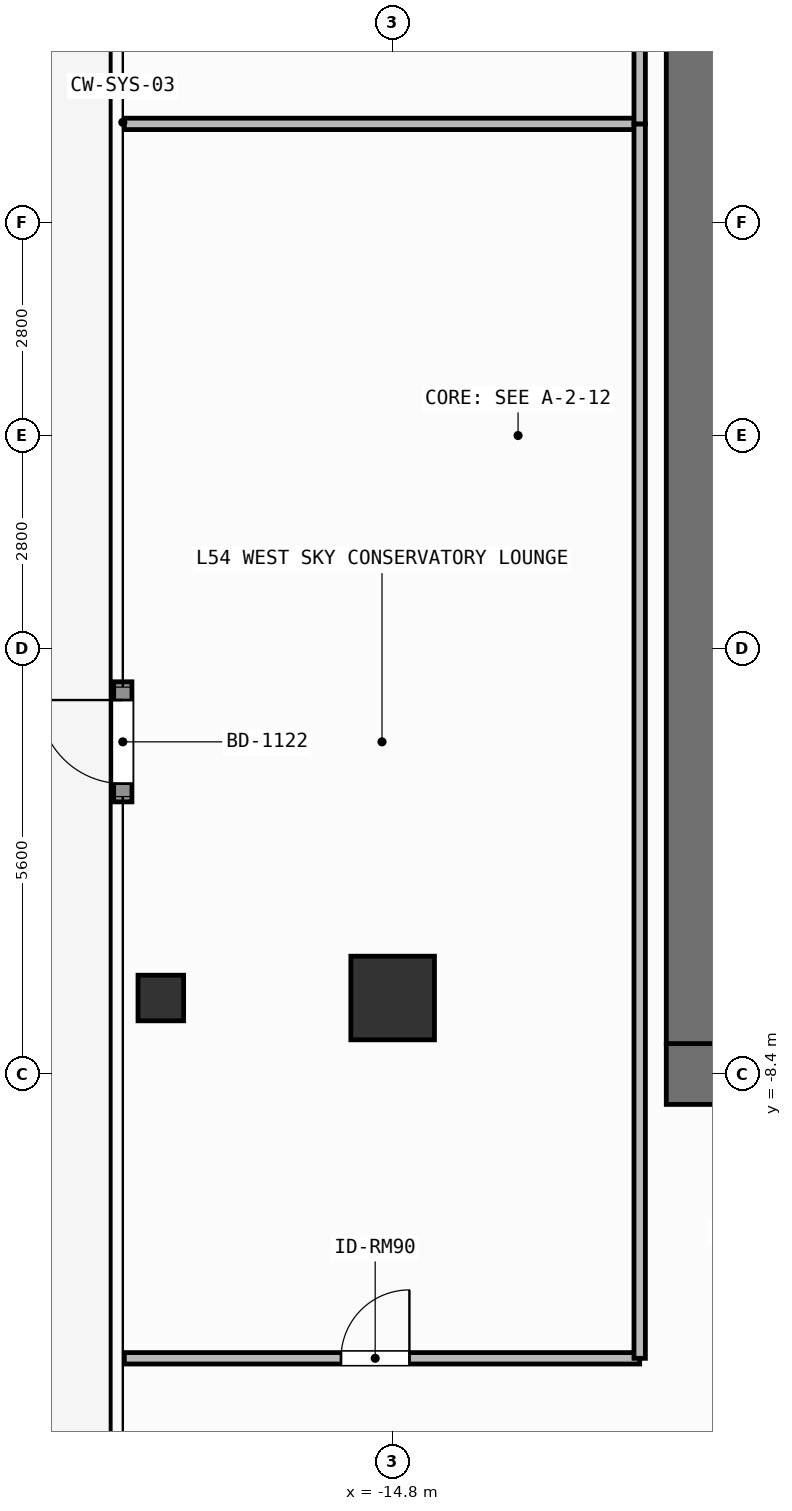
"""IFC4 building model, lengths in metres.
Left out: names, types, materials, properties, quantities, classifications, styles, units other than length and angle.
Written with IfcOpenShell. Run it as: python <this file> out.ifc"""

import sys

from ifc_helpers import new_model, si_unit, direction, frame, frame_2d, origin, origin_2d, place, context, subcontext, project, spatial, rectangle, hollow_rectangle, extrude, element, fill, save


model = new_model("IFC4")
c1 = context("Model", 3, precision=1e-05, world=origin(), true_north=direction((0.0, 1.0)))
c2 = subcontext(c1, "Body", "Model", "MODEL_VIEW")
j1 = project(units=[si_unit("LENGTHUNIT", "METRE"), si_unit("PLANEANGLEUNIT", "RADIAN")], contexts=[c1])
p1 = place(None, origin())
s1 = spatial("IfcSite", under=j1, at=p1, CompositionType="ELEMENT")
p2 = place(p1, origin())
s2 = spatial("IfcBuilding", under=s1, at=p2, CompositionType="ELEMENT")
p3 = place(p2, frame((0.0, 0.0, 219.6)))
s3 = spatial("IfcBuildingStorey", under=s2, at=p3, CompositionType="ELEMENT", Elevation=219.6)
p4 = place(p3, frame((-11.2, -8.4, 0.0), z_axis=(0.0, 0.0, 1.0), x_axis=(1.0, 0.0, 0.0)))
e1 = element("IfcWall", 1, at=p4, inside=s3, PredefinedType="SHEAR", context=c2, shape_type="SweptSolid", body=[
    extrude(rectangle(XDim=1.5, YDim=0.8, at=frame_2d((0.75, 0.0))), origin(), (0.0, 0.0, 1.0), 3.9),
])
p5 = place(p3, frame((-10.8, -8.0, 0.0), z_axis=(0.0, 0.0, 1.0), x_axis=(0.0, 1.0, 0.0)))
e2 = element("IfcWall", 2, at=p5, inside=s3, PredefinedType="SHEAR", context=c2, shape_type="SweptSolid", body=[
    extrude(rectangle(XDim=16.0, YDim=0.8, at=frame_2d((8.0, 0.0))), origin(), (0.0, 0.0, 1.0), 3.9),
])
p6 = place(p3, frame((-14.8, -7.4, 0.0), z_axis=(0.0, 0.0, 1.0), x_axis=(1.0, 0.0, 0.0)))
e3 = element("IfcColumn", 3, at=p6, inside=s3, PredefinedType="COLUMN", context=c2, shape_type="SweptSolid", body=[
    extrude(rectangle(XDim=1.1, YDim=1.1, at=origin_2d()), origin(), (0.0, 0.0, 1.0), 3.9),
])
p7 = place(p3, frame((-17.85, -7.4, 0.0), z_axis=(0.0, 0.0, 1.0), x_axis=(1.0, 0.0, 0.0)))
e4 = element("IfcColumn", 4, at=p7, inside=s3, PredefinedType="COLUMN", context=c2, shape_type="SweptSolid", body=[
    extrude(hollow_rectangle(XDim=0.6, YDim=0.6, WallThickness=0.028, at=origin_2d()), origin(), (0.0, 0.0, 1.0), 3.9),
])
p8 = place(p3, frame((-18.35, -4.82, 0.0), z_axis=(0.0, 0.0, 1.0), x_axis=(0.0, 1.0, 0.0)))
e5 = element("IfcWall", 5, at=p8, inside=s3, PredefinedType="SOLIDWALL", context=c2, shape_type="SweptSolid", body=[
    extrude(rectangle(XDim=1.58, YDim=0.24, at=frame_2d((0.79, 0.0))), origin(), (0.0, 0.0, 1.0), 3.68),
])
p9 = place(p8, frame((0.24, 0.0, 0.0)))
e6 = element("IfcOpeningElement", 6, at=p9, cuts=e5, PredefinedType="OPENING", context=c2, shape_type="SweptSolid", body=[
    extrude(rectangle(XDim=1.1, YDim=2.2, at=frame_2d((0.55, 1.1))), frame((0.0, 0.13, 0.0), z_axis=(0.0, -1.0, 0.0), x_axis=(1.0, 0.0, 0.0)), (0.0, 0.0, 1.0), 0.26),
])
p10 = place(p3, frame((-18.33, -12.14, 0.0), z_axis=(0.0, 0.0, 1.0), x_axis=(1.0, 0.0, 0.0)))
e7 = element("IfcWall", 7, at=p10, inside=s3, PredefinedType="PARTITIONING", context=c2, shape_type="SweptSolid", body=[
    extrude(rectangle(XDim=6.78, YDim=0.15, at=frame_2d((3.39, 0.0))), origin(), (0.0, 0.0, 1.0), 3.68),
])
p11 = place(p10, frame((2.85, 0.0, 0.0)))
e8 = element("IfcOpeningElement", 8, at=p11, cuts=e7, PredefinedType="OPENING", context=c2, shape_type="SweptSolid", body=[
    extrude(rectangle(XDim=0.9, YDim=2.1, at=frame_2d((0.45, 1.05))), frame((0.0, 0.085, 0.0), z_axis=(0.0, -1.0, 0.0), x_axis=(1.0, 0.0, 0.0)), (0.0, 0.0, 1.0), 0.17),
])
p12 = place(p3, frame((-18.33, 4.1, 0.0), z_axis=(0.0, 0.0, 1.0), x_axis=(1.0, 0.0, 0.0)))
e9 = element("IfcWall", 9, at=p12, inside=s3, PredefinedType="PARTITIONING", context=c2, shape_type="SweptSolid", body=[
    extrude(rectangle(XDim=6.78, YDim=0.15, at=frame_2d((3.39, 0.0))), origin(), (0.0, 0.0, 1.0), 3.68),
])
p13 = place(p3, frame((-11.55, -12.14, 0.0), z_axis=(0.0, 0.0, 1.0), x_axis=(0.0, 1.0, 0.0)))
e10 = element("IfcWall", 10, at=p13, inside=s3, PredefinedType="PARTITIONING", context=c2, shape_type="SweptSolid", body=[
    extrude(rectangle(XDim=16.24, YDim=0.15, at=frame_2d((8.12, 0.0))), origin(), (0.0, 0.0, 1.0), 3.68),
])
p14 = place(p3, frame((-11.55, 4.1, 0.0), z_axis=(0.0, 0.0, 1.0), x_axis=(0.0, 1.0, 0.0)))
e11 = element("IfcWall", 11, at=p14, inside=s3, PredefinedType="PARTITIONING", context=c2, shape_type="SweptSolid", body=[
    extrude(rectangle(XDim=8.04, YDim=0.15, at=frame_2d((4.02, 0.0))), origin(), (0.0, 0.0, 1.0), 3.68),
])
p15 = place(p9, origin())
e12 = element("IfcDoor", 12, at=p15, inside=s3, OperationType="SINGLE_SWING_RIGHT", PredefinedType="DOOR", context=c2, shape_type="SweptSolid", body=[
    extrude(rectangle(XDim=1.1, YDim=2.2, at=frame_2d((0.55, 1.1))), frame((0.0, 0.025, 0.0), z_axis=(0.0, -1.0, 0.0), x_axis=(1.0, 0.0, 0.0)), (0.0, 0.0, 1.0), 0.05),
])
fill(e6, e12)
p16 = place(p11, origin())
e13 = element("IfcDoor", 13, at=p16, inside=s3, OperationType="SINGLE_SWING_RIGHT", PredefinedType="DOOR", context=c2, shape_type="SweptSolid", body=[
    extrude(rectangle(XDim=0.9, YDim=2.1, at=frame_2d((0.45, 1.05))), frame((0.0, 0.025, 0.0), z_axis=(0.0, -1.0, 0.0), x_axis=(1.0, 0.0, 0.0)), (0.0, 0.0, 1.0), 0.05),
])
fill(e8, e13)
save(model, sys.argv[1])
